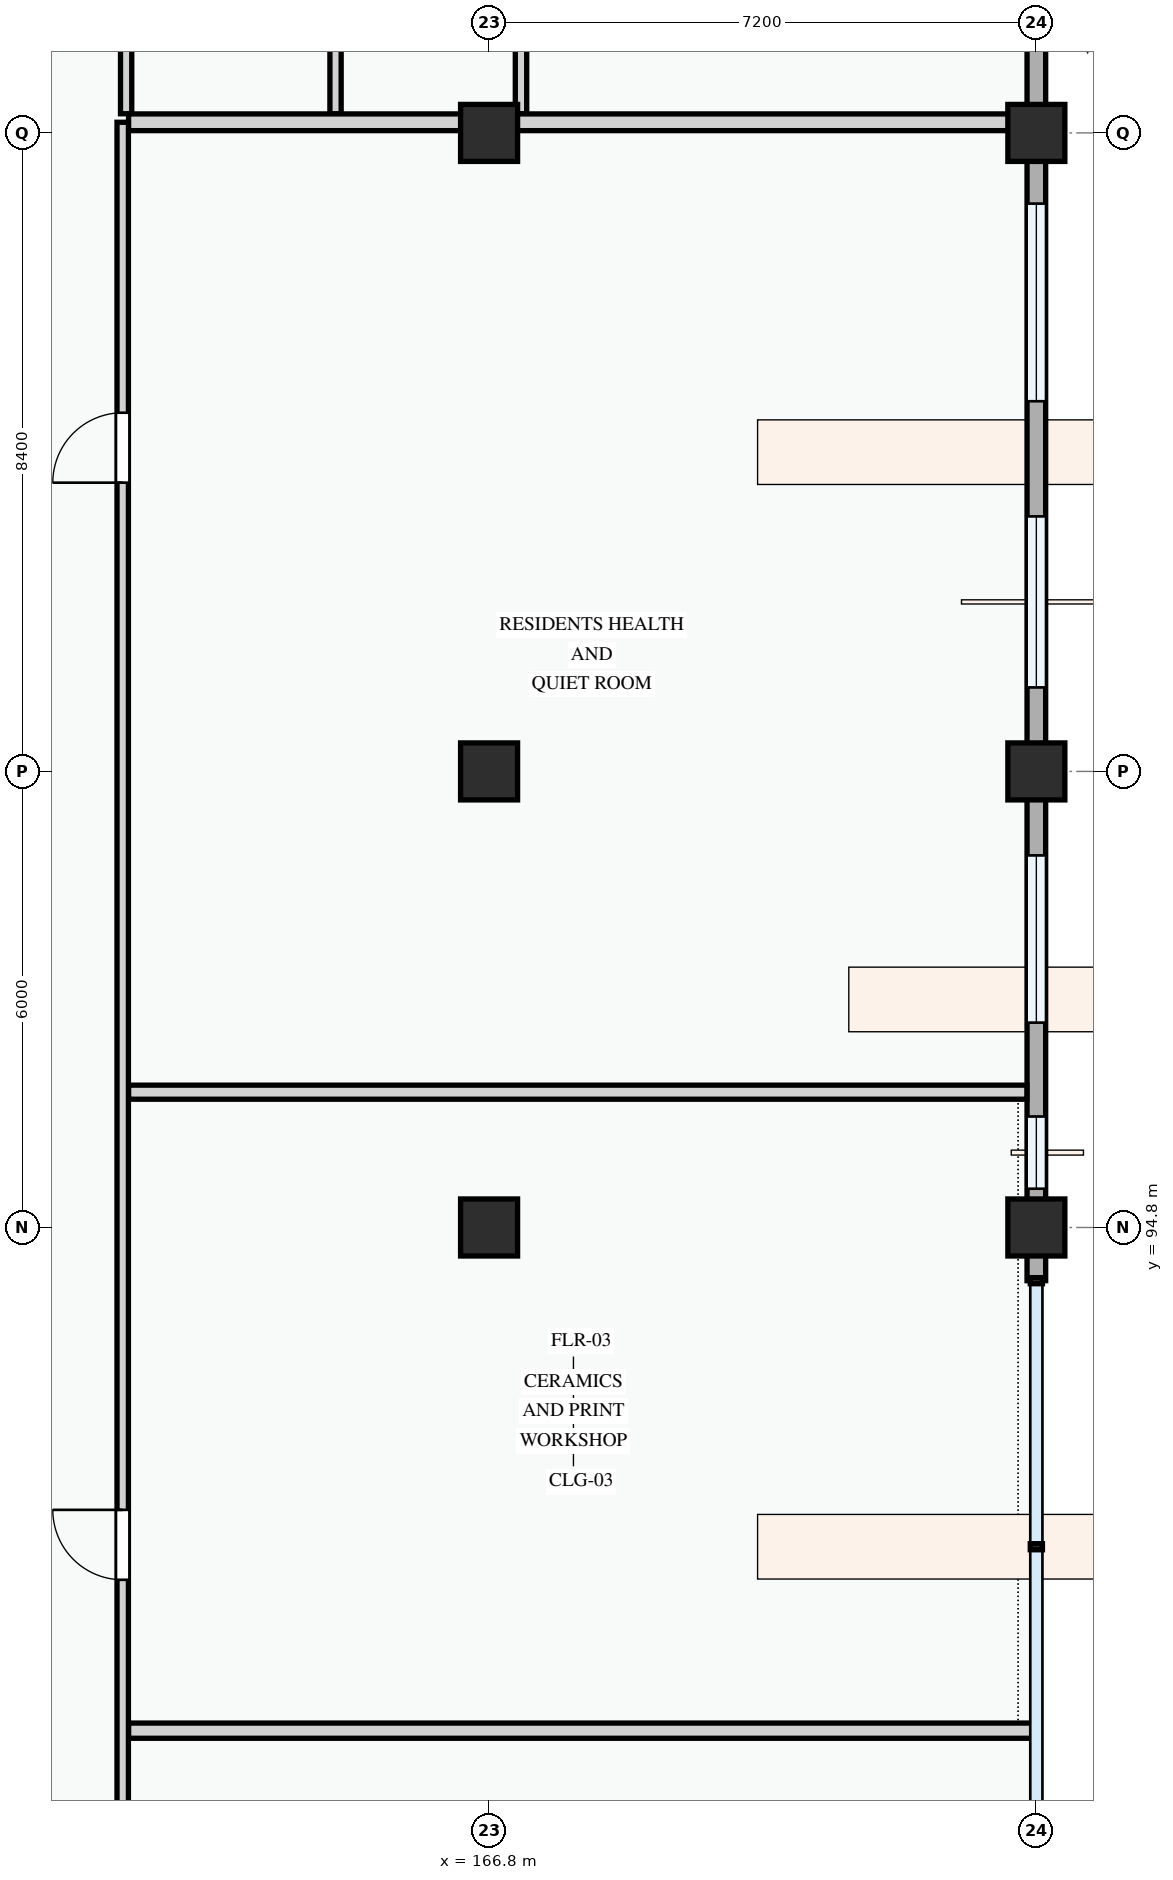
"""IFC4 building model, lengths in metres.
Left out: names, types, materials, properties, quantities, classifications, styles, units other than length and angle.
Written with IfcOpenShell. Run it as: python <this file> out.ifc"""

import sys

from ifc_helpers import new_model, si_unit, direction, frame, frame_2d, origin, origin_2d, place, context, subcontext, project, spatial, rectangle, extrude, element, fill, save


model = new_model("IFC4")
c1 = context("Model", 3, precision=1e-05, world=origin(), true_north=direction((0.0, 1.0)))
c2 = subcontext(c1, "Body", "Model", "MODEL_VIEW")
j1 = project(units=[si_unit("LENGTHUNIT", "METRE"), si_unit("PLANEANGLEUNIT", "RADIAN")], contexts=[c1])
p1 = place(None, origin())
s1 = spatial("IfcSite", under=j1, at=p1, CompositionType="ELEMENT")
p2 = place(p1, origin())
s2 = spatial("IfcBuilding", under=s1, at=p2, CompositionType="ELEMENT")
p3 = place(p2, frame((0.0, 0.0, 4.5)))
s3 = spatial("IfcBuildingStorey", under=s2, at=p3, CompositionType="ELEMENT", Elevation=4.5)
for number, where, z_axis, x_axis in (
    (1, (166.8, 94.8, 0.0), (0.0, 0.0, 1.0), (1.0, 0.0, 0.0)),
    (2, (166.8, 100.8, 0.0), (0.0, 0.0, 1.0), (1.0, 0.0, 0.0)),
    (3, (166.8, 109.2, 0.0), (0.0, 0.0, 1.0), (1.0, 0.0, 0.0)),
    (4, (174.0, 94.8, 0.0), (0.0, 0.0, 1.0), (1.0, 0.0, 0.0)),
    (5, (174.0, 100.8, 0.0), (0.0, 0.0, 1.0), (1.0, 0.0, 0.0)),
    (6, (174.0, 109.2, 0.0), (0.0, 0.0, 1.0), (1.0, 0.0, 0.0)),
):
    element("IfcColumn", number, at=place(p3, frame(where, z_axis=z_axis, x_axis=x_axis)), inside=s3, PredefinedType="COLUMN", context=c2, shape_type="SweptSolid", body=[
        extrude(rectangle(XDim=0.75, YDim=0.75, at=origin_2d()), origin(), (0.0, 0.0, 1.0), 3.6),
    ])
p4 = place(p3, frame((174.0, 109.2, 0.0), z_axis=(0.0, 0.0, 1.0), x_axis=(0.0, 1.0, 0.0)))
e7 = element("IfcWall", 7, at=p4, inside=s3, PredefinedType="STANDARD", context=c2, shape_type="SweptSolid", body=[
    extrude(rectangle(XDim=6.0, YDim=0.245, at=frame_2d((3.0, 0.0))), origin(), (0.0, 0.0, 1.0), 2.875),
])
p5 = place(p4, frame((1.13, 0.0, 0.78)))
e8 = element("IfcOpeningElement", 8, at=p5, cuts=e7, PredefinedType="OPENING", context=c2, shape_type="SweptSolid", body=[
    extrude(rectangle(XDim=1.0, YDim=1.25, at=frame_2d((0.5, 0.625))), frame((0.0, 0.133, 0.0), z_axis=(0.0, -1.0, 0.0), x_axis=(1.0, 0.0, 0.0)), (0.0, 0.0, 1.0), 0.265),
])
p6 = place(p4, frame((3.645, 0.0, 0.78)))
e9 = element("IfcOpeningElement", 9, at=p6, cuts=e7, PredefinedType="OPENING", context=c2, shape_type="SweptSolid", body=[
    extrude(rectangle(XDim=1.45, YDim=1.6, at=frame_2d((0.725, 0.8))), frame((0.0, 0.133, 0.0), z_axis=(0.0, -1.0, 0.0), x_axis=(1.0, 0.0, 0.0)), (0.0, 0.0, 1.0), 0.265),
])
p7 = place(p3, frame((174.0, 94.1, 0.0), z_axis=(0.0, 0.0, 1.0), x_axis=(0.0, 1.0, 0.0)))
e10 = element("IfcWall", 10, at=p7, inside=s3, PredefinedType="STANDARD", context=c2, shape_type="SweptSolid", body=[
    extrude(rectangle(XDim=0.7, YDim=0.245, at=frame_2d((0.35, 0.0))), origin(), (0.0, 0.0, 1.0), 2.725),
])
p8 = place(p3, frame((174.0, 94.8, 0.0), z_axis=(0.0, 0.0, 1.0), x_axis=(0.0, 1.0, 0.0)))
e11 = element("IfcWall", 11, at=p8, inside=s3, PredefinedType="STANDARD", context=c2, shape_type="SweptSolid", body=[
    extrude(rectangle(XDim=6.0, YDim=0.245, at=frame_2d((3.0, 0.0))), origin(), (0.0, 0.0, 1.0), 2.875),
])
p9 = place(p8, frame((0.51, 0.0, 0.78)))
e12 = element("IfcOpeningElement", 12, at=p9, cuts=e11, PredefinedType="OPENING", context=c2, shape_type="SweptSolid", body=[
    extrude(rectangle(XDim=0.95, YDim=1.15, at=frame_2d((0.475, 0.575))), frame((0.0, 0.133, 0.0), z_axis=(0.0, -1.0, 0.0), x_axis=(1.0, 0.0, 0.0)), (0.0, 0.0, 1.0), 0.265),
])
p10 = place(p8, frame((2.695, 0.0, 0.78)))
e13 = element("IfcOpeningElement", 13, at=p10, cuts=e11, PredefinedType="OPENING", context=c2, shape_type="SweptSolid", body=[
    extrude(rectangle(XDim=2.2, YDim=1.5, at=frame_2d((1.1, 0.75))), frame((0.0, 0.133, 0.0), z_axis=(0.0, -1.0, 0.0), x_axis=(1.0, 0.0, 0.0)), (0.0, 0.0, 1.0), 0.265),
])
p11 = place(p3, frame((174.0, 100.8, 0.0), z_axis=(0.0, 0.0, 1.0), x_axis=(0.0, 1.0, 0.0)))
e14 = element("IfcWall", 14, at=p11, inside=s3, PredefinedType="STANDARD", context=c2, shape_type="SweptSolid", body=[
    extrude(rectangle(XDim=8.4, YDim=0.245, at=frame_2d((4.2, 0.0))), origin(), (0.0, 0.0, 1.0), 2.725),
])
p12 = place(p11, frame((1.105, 0.0, 0.78)))
e15 = element("IfcOpeningElement", 15, at=p12, cuts=e14, PredefinedType="OPENING", context=c2, shape_type="SweptSolid", body=[
    extrude(rectangle(XDim=2.25, YDim=1.6, at=frame_2d((1.125, 0.8))), frame((0.0, 0.133, 0.0), z_axis=(0.0, -1.0, 0.0), x_axis=(1.0, 0.0, 0.0)), (0.0, 0.0, 1.0), 0.265),
])
p13 = place(p11, frame((4.87, 0.0, 0.78)))
e16 = element("IfcOpeningElement", 16, at=p13, cuts=e14, PredefinedType="OPENING", context=c2, shape_type="SweptSolid", body=[
    extrude(rectangle(XDim=2.6, YDim=1.7, at=frame_2d((1.3, 0.85))), frame((0.0, 0.133, 0.0), z_axis=(0.0, -1.0, 0.0), x_axis=(1.0, 0.0, 0.0)), (0.0, 0.0, 1.0), 0.265),
])
for number, where, z_axis, x_axis in (
    (17, (162.025, 113.324, 0.0), (0.0, 0.0, 1.0), (0.0, -1.0, 0.0)),
    (18, (164.78, 113.324, 0.0), (0.0, 0.0, 1.0), (0.0, -1.0, 0.0)),
):
    element("IfcWall", number, at=place(p3, frame(where, z_axis=z_axis, x_axis=x_axis)), inside=s3, PredefinedType="PARTITIONING", context=c2, shape_type="SweptSolid", body=[
        extrude(rectangle(XDim=3.872, YDim=0.148, at=frame_2d((1.936, 0.0))), origin(), (0.0, 0.0, 1.0), 3.3),
    ])
p14 = place(p3, frame((167.22, 109.452, 0.0), z_axis=(0.0, 0.0, 1.0), x_axis=(0.0, 1.0, 0.0)))
e19 = element("IfcWall", 19, at=p14, inside=s3, PredefinedType="PARTITIONING", context=c2, shape_type="SweptSolid", body=[
    extrude(rectangle(XDim=14.008, YDim=0.15, at=frame_2d((7.004, 0.0))), origin(), (0.0, 0.0, 1.0), 2.725),
])
p15 = place(p14, frame((2.438, 0.0, 0.0)))
e20 = element("IfcOpeningElement", 20, at=p15, cuts=e19, PredefinedType="OPENING", context=c2, shape_type="SweptSolid", body=[
    extrude(rectangle(XDim=0.92, YDim=2.1, at=frame_2d((0.46, 1.05))), frame((0.0, 0.085, 0.0), z_axis=(0.0, -1.0, 0.0), x_axis=(1.0, 0.0, 0.0)), (0.0, 0.0, 1.0), 0.17),
])
p16 = place(p3, frame((162.057, 88.18, 0.0), z_axis=(0.0, 0.0, 1.0), x_axis=(1.0, 0.0, 0.0)))
e21 = element("IfcWall", 21, at=p16, inside=s3, PredefinedType="PARTITIONING", context=c2, shape_type="SweptSolid", body=[
    extrude(rectangle(XDim=11.883, YDim=0.2, at=frame_2d((5.941, 0.0))), origin(), (0.0, 0.0, 1.0), 3.3),
])
p17 = place(p3, frame((162.057, 96.58, 0.0), z_axis=(0.0, 0.0, 1.0), x_axis=(1.0, 0.0, 0.0)))
e22 = element("IfcWall", 22, at=p17, inside=s3, PredefinedType="PARTITIONING", context=c2, shape_type="SweptSolid", body=[
    extrude(rectangle(XDim=11.819, YDim=0.185, at=frame_2d((5.909, 0.0))), origin(), (0.0, 0.0, 1.0), 3.3),
])
p18 = place(p3, frame((162.057, 109.34, 0.0), z_axis=(0.0, 0.0, 1.0), x_axis=(1.0, 0.0, 0.0)))
e23 = element("IfcWall", 23, at=p18, inside=s3, PredefinedType="PARTITIONING", context=c2, shape_type="SweptSolid", body=[
    extrude(rectangle(XDim=11.819, YDim=0.22, at=frame_2d((5.909, 0.0))), origin(), (0.0, 0.0, 1.0), 2.675),
])
p19 = place(p3, frame((161.98, 80.46, 0.0), z_axis=(0.0, 0.0, 1.0), x_axis=(0.0, 1.0, 0.0)))
e24 = element("IfcWall", 24, at=p19, inside=s3, PredefinedType="PARTITIONING", context=c2, shape_type="SweptSolid", body=[
    extrude(rectangle(XDim=28.88, YDim=0.15, at=frame_2d((14.44, 0.0))), origin(), (0.0, 0.0, 1.0), 3.3),
])
p20 = place(p19, frame((2.402, 0.0, 0.0)))
e25 = element("IfcOpeningElement", 25, at=p20, cuts=e24, PredefinedType="OPENING", context=c2, shape_type="SweptSolid", body=[
    extrude(rectangle(XDim=0.92, YDim=2.1, at=frame_2d((0.46, 1.05))), frame((0.0, 0.085, 0.0), z_axis=(0.0, -1.0, 0.0), x_axis=(1.0, 0.0, 0.0)), (0.0, 0.0, 1.0), 0.17),
])
p21 = place(p19, frame((9.705, 0.0, 0.0)))
e26 = element("IfcOpeningElement", 26, at=p21, cuts=e24, PredefinedType="OPENING", context=c2, shape_type="SweptSolid", body=[
    extrude(rectangle(XDim=0.92, YDim=2.1, at=frame_2d((0.46, 1.05))), frame((0.0, 0.085, 0.0), z_axis=(0.0, -1.0, 0.0), x_axis=(1.0, 0.0, 0.0)), (0.0, 0.0, 1.0), 0.17),
])
p22 = place(p19, frame((24.139, 0.0, 0.0)))
e27 = element("IfcOpeningElement", 27, at=p22, cuts=e24, PredefinedType="OPENING", context=c2, shape_type="SweptSolid", body=[
    extrude(rectangle(XDim=0.92, YDim=2.1, at=frame_2d((0.46, 1.05))), frame((0.0, 0.085, 0.0), z_axis=(0.0, -1.0, 0.0), x_axis=(1.0, 0.0, 0.0)), (0.0, 0.0, 1.0), 0.17),
])
p23 = place(p9, origin())
e28 = element("IfcWindow", 28, at=p23, inside=s3, PartitioningType="SINGLE_PANEL", PredefinedType="WINDOW", context=c2, shape_type="SweptSolid", body=[
    extrude(rectangle(XDim=0.95, YDim=1.15, at=frame_2d((0.475, 0.575))), frame((0.0, 0.03, 0.0), z_axis=(0.0, -1.0, 0.0), x_axis=(1.0, 0.0, 0.0)), (0.0, 0.0, 1.0), 0.06),
])
fill(e12, e28)
p24 = place(p10, origin())
e29 = element("IfcWindow", 29, at=p24, inside=s3, PartitioningType="DOUBLE_PANEL_VERTICAL", PredefinedType="WINDOW", context=c2, shape_type="SweptSolid", body=[
    extrude(rectangle(XDim=2.2, YDim=1.5, at=frame_2d((1.1, 0.75))), frame((0.0, 0.03, 0.0), z_axis=(0.0, -1.0, 0.0), x_axis=(1.0, 0.0, 0.0)), (0.0, 0.0, 1.0), 0.06),
])
fill(e13, e29)
p25 = place(p12, origin())
e30 = element("IfcWindow", 30, at=p25, inside=s3, PartitioningType="DOUBLE_PANEL_VERTICAL", PredefinedType="WINDOW", context=c2, shape_type="SweptSolid", body=[
    extrude(rectangle(XDim=2.25, YDim=1.6, at=frame_2d((1.125, 0.8))), frame((0.0, 0.03, 0.0), z_axis=(0.0, -1.0, 0.0), x_axis=(1.0, 0.0, 0.0)), (0.0, 0.0, 1.0), 0.06),
])
fill(e15, e30)
p26 = place(p13, origin())
e31 = element("IfcWindow", 31, at=p26, inside=s3, PartitioningType="DOUBLE_PANEL_VERTICAL", PredefinedType="WINDOW", context=c2, shape_type="SweptSolid", body=[
    extrude(rectangle(XDim=2.6, YDim=1.7, at=frame_2d((1.3, 0.85))), frame((0.0, 0.03, 0.0), z_axis=(0.0, -1.0, 0.0), x_axis=(1.0, 0.0, 0.0)), (0.0, 0.0, 1.0), 0.06),
])
fill(e16, e31)
p27 = place(p21, origin())
e32 = element("IfcDoor", 32, at=p27, inside=s3, OperationType="SINGLE_SWING_RIGHT", PredefinedType="DOOR", context=c2, shape_type="SweptSolid", body=[
    extrude(rectangle(XDim=0.92, YDim=2.1, at=frame_2d((0.46, 1.05))), frame((0.0, 0.025, 0.0), z_axis=(0.0, -1.0, 0.0), x_axis=(1.0, 0.0, 0.0)), (0.0, 0.0, 1.0), 0.05),
])
fill(e26, e32)
p28 = place(p22, origin())
e33 = element("IfcDoor", 33, at=p28, inside=s3, OperationType="SINGLE_SWING_LEFT", PredefinedType="DOOR", context=c2, shape_type="SweptSolid", body=[
    extrude(rectangle(XDim=0.92, YDim=2.1, at=frame_2d((0.46, 1.05))), frame((0.0, 0.025, 0.0), z_axis=(0.0, -1.0, 0.0), x_axis=(1.0, 0.0, 0.0)), (0.0, 0.0, 1.0), 0.05),
])
fill(e27, e33)
save(model, sys.argv[1])
